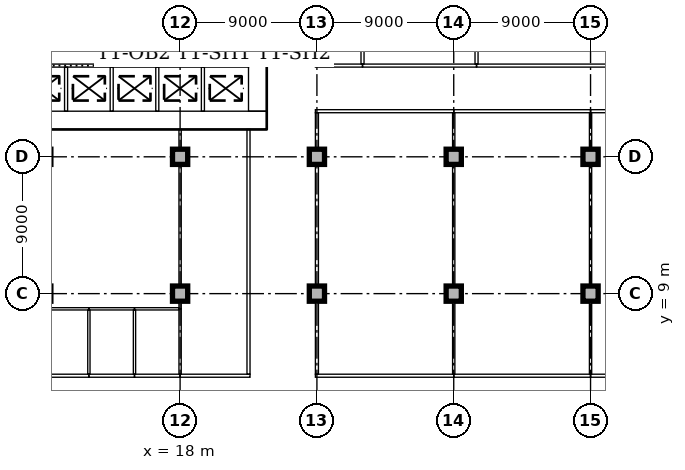
"""IFC4 building model, lengths in metres.
Left out: names, types, materials, properties, quantities, classifications, styles, units other than length and angle.
Written with IfcOpenShell. Run it as: python <this file> out.ifc"""

import sys

from ifc_helpers import new_model, si_unit, direction, frame, frame_2d, origin, origin_2d, place, context, subcontext, project, spatial, rectangle, extrude, element, fill, save


model = new_model("IFC4")
c1 = context("Model", 3, precision=1e-05, world=origin(), true_north=direction((0.0, 1.0)))
c2 = subcontext(c1, "Body", "Model", "MODEL_VIEW")
j1 = project(units=[si_unit("LENGTHUNIT", "METRE"), si_unit("PLANEANGLEUNIT", "RADIAN")], contexts=[c1])
p1 = place(None, origin())
s1 = spatial("IfcSite", under=j1, at=p1, CompositionType="ELEMENT")
p2 = place(p1, origin())
s2 = spatial("IfcBuilding", under=s1, at=p2, CompositionType="ELEMENT")
p3 = place(p2, origin())
s3 = spatial("IfcBuildingStorey", under=s2, at=p3, CompositionType="ELEMENT", Elevation=0.0)
p4 = place(p3, frame((3.9, 20.4, 0.0), z_axis=(0.0, 0.0, 1.0), x_axis=(1.0, 0.0, 0.0)))
e1 = element("IfcWall", 1, at=p4, inside=s3, PredefinedType="SOLIDWALL", context=c2, shape_type="SweptSolid", body=[
    extrude(rectangle(XDim=19.8, YDim=1.2, at=frame_2d((9.9, 0.0))), origin(), (0.0, 0.0, 1.0), 6.0),
])
p5 = place(p3, frame((23.1, 21.0, 0.0), z_axis=(0.0, 0.0, 1.0), x_axis=(0.0, 1.0, 0.0)))
e2 = element("IfcWall", 2, at=p5, inside=s3, PredefinedType="SOLIDWALL", context=c2, shape_type="SweptSolid", body=[
    extrude(rectangle(XDim=10.5, YDim=1.2, at=frame_2d((5.25, 0.0))), origin(), (0.0, 0.0, 1.0), 6.0),
])
p6 = place(p5, frame((4.35, 0.0, 0.0)))
e3 = element("IfcOpeningElement", 3, at=p6, cuts=e2, PredefinedType="OPENING", context=c2, shape_type="SweptSolid", body=[
    extrude(rectangle(XDim=1.8, YDim=2.1, at=frame_2d((0.9, 1.05))), frame((0.0, 0.61, 0.0), z_axis=(0.0, -1.0, 0.0), x_axis=(1.0, 0.0, 0.0)), (0.0, 0.0, 1.0), 1.22),
])
for number, where, z_axis, x_axis in (
    (4, (18.0, 9.0, 0.0), (0.0, 0.0, 1.0), (1.0, 0.0, 0.0)),
    (5, (18.0, 18.0, 0.0), (0.0, 0.0, 1.0), (1.0, 0.0, 0.0)),
    (6, (27.0, 9.0, 0.0), (0.0, 0.0, 1.0), (1.0, 0.0, 0.0)),
    (7, (27.0, 18.0, 0.0), (0.0, 0.0, 1.0), (1.0, 0.0, 0.0)),
    (8, (36.0, 9.0, 0.0), (0.0, 0.0, 1.0), (1.0, 0.0, 0.0)),
    (9, (36.0, 18.0, 0.0), (0.0, 0.0, 1.0), (1.0, 0.0, 0.0)),
    (10, (45.0, 9.0, 0.0), (0.0, 0.0, 1.0), (1.0, 0.0, 0.0)),
    (11, (45.0, 18.0, 0.0), (0.0, 0.0, 1.0), (1.0, 0.0, 0.0)),
):
    element("IfcColumn", number, at=place(p3, frame(where, z_axis=z_axis, x_axis=x_axis)), inside=s3, PredefinedType="COLUMN", context=c2, shape_type="SweptSolid", body=[
        extrude(rectangle(XDim=1.0, YDim=1.0, at=origin_2d()), origin(), (0.0, 0.0, 1.0), 5.7),
    ])
p7 = place(p3, frame((9.0, 3.6, 0.0), z_axis=(0.0, 0.0, 1.0), x_axis=(1.0, 0.0, 0.0)))
e12 = element("IfcWall", 12, at=p7, inside=s3, PredefinedType="PARTITIONING", context=c2, shape_type="SweptSolid", body=[
    extrude(rectangle(XDim=3.0, YDim=0.2, at=frame_2d((1.5, 0.0))), origin(), (0.0, 0.0, 1.0), 5.7),
])
p8 = place(p7, frame((1.0, 0.0, 0.0)))
e13 = element("IfcOpeningElement", 13, at=p8, cuts=e12, PredefinedType="OPENING", context=c2, shape_type="SweptSolid", body=[
    extrude(rectangle(XDim=1.0, YDim=2.1, at=frame_2d((0.5, 1.05))), frame((0.0, 0.11, 0.0), z_axis=(0.0, -1.0, 0.0), x_axis=(1.0, 0.0, 0.0)), (0.0, 0.0, 1.0), 0.22),
])
p9 = place(p3, frame((12.0, 3.6, 0.0), z_axis=(0.0, 0.0, 1.0), x_axis=(1.0, 0.0, 0.0)))
e14 = element("IfcWall", 14, at=p9, inside=s3, PredefinedType="PARTITIONING", context=c2, shape_type="SweptSolid", body=[
    extrude(rectangle(XDim=3.0, YDim=0.2, at=frame_2d((1.5, 0.0))), origin(), (0.0, 0.0, 1.0), 5.7),
])
p10 = place(p9, frame((1.0, 0.0, 0.0)))
e15 = element("IfcOpeningElement", 15, at=p10, cuts=e14, PredefinedType="OPENING", context=c2, shape_type="SweptSolid", body=[
    extrude(rectangle(XDim=1.0, YDim=2.1, at=frame_2d((0.5, 1.05))), frame((0.0, 0.11, 0.0), z_axis=(0.0, -1.0, 0.0), x_axis=(1.0, 0.0, 0.0)), (0.0, 0.0, 1.0), 0.22),
])
p11 = place(p3, frame((15.0, 3.6, 0.0), z_axis=(0.0, 0.0, 1.0), x_axis=(1.0, 0.0, 0.0)))
e16 = element("IfcWall", 16, at=p11, inside=s3, PredefinedType="PARTITIONING", context=c2, shape_type="SweptSolid", body=[
    extrude(rectangle(XDim=3.0, YDim=0.2, at=frame_2d((1.5, 0.0))), origin(), (0.0, 0.0, 1.0), 5.7),
])
p12 = place(p11, frame((1.0, 0.0, 0.0)))
e17 = element("IfcOpeningElement", 17, at=p12, cuts=e16, PredefinedType="OPENING", context=c2, shape_type="SweptSolid", body=[
    extrude(rectangle(XDim=1.0, YDim=2.1, at=frame_2d((0.5, 1.05))), frame((0.0, 0.11, 0.0), z_axis=(0.0, -1.0, 0.0), x_axis=(1.0, 0.0, 0.0)), (0.0, 0.0, 1.0), 0.22),
])
p13 = place(p3, frame((18.0, 3.6, 0.0), z_axis=(0.0, 0.0, 1.0), x_axis=(1.0, 0.0, 0.0)))
e18 = element("IfcWall", 18, at=p13, inside=s3, PredefinedType="PARTITIONING", context=c2, shape_type="SweptSolid", body=[
    extrude(rectangle(XDim=4.6, YDim=0.2, at=frame_2d((2.3, 0.0))), origin(), (0.0, 0.0, 1.0), 5.7),
])
p14 = place(p3, frame((26.9, 3.6, 0.0), z_axis=(0.0, 0.0, 1.0), x_axis=(1.0, 0.0, 0.0)))
e19 = element("IfcWall", 19, at=p14, inside=s3, PredefinedType="PARTITIONING", context=c2, shape_type="SweptSolid", body=[
    extrude(rectangle(XDim=9.1, YDim=0.2, at=frame_2d((4.55, 0.0))), origin(), (0.0, 0.0, 1.0), 5.7),
])
p15 = place(p3, frame((36.0, 3.6, 0.0), z_axis=(0.0, 0.0, 1.0), x_axis=(1.0, 0.0, 0.0)))
e20 = element("IfcWall", 20, at=p15, inside=s3, PredefinedType="PARTITIONING", context=c2, shape_type="SweptSolid", body=[
    extrude(rectangle(XDim=9.0, YDim=0.2, at=frame_2d((4.5, 0.0))), origin(), (0.0, 0.0, 1.0), 5.7),
])
p16 = place(p15, frame((4.0, 0.0, 0.0)))
e21 = element("IfcOpeningElement", 21, at=p16, cuts=e20, PredefinedType="OPENING", context=c2, shape_type="SweptSolid", body=[
    extrude(rectangle(XDim=1.0, YDim=2.1, at=frame_2d((0.5, 1.05))), frame((0.0, 0.11, 0.0), z_axis=(0.0, -1.0, 0.0), x_axis=(1.0, 0.0, 0.0)), (0.0, 0.0, 1.0), 0.22),
])
p17 = place(p3, frame((45.0, 3.6, 0.0), z_axis=(0.0, 0.0, 1.0), x_axis=(1.0, 0.0, 0.0)))
e22 = element("IfcWall", 22, at=p17, inside=s3, PredefinedType="PARTITIONING", context=c2, shape_type="SweptSolid", body=[
    extrude(rectangle(XDim=9.0, YDim=0.2, at=frame_2d((4.5, 0.0))), origin(), (0.0, 0.0, 1.0), 5.7),
])
p18 = place(p17, frame((4.0, 0.0, 0.0)))
e23 = element("IfcOpeningElement", 23, at=p18, cuts=e22, PredefinedType="OPENING", context=c2, shape_type="SweptSolid", body=[
    extrude(rectangle(XDim=1.0, YDim=2.1, at=frame_2d((0.5, 1.05))), frame((0.0, 0.11, 0.0), z_axis=(0.0, -1.0, 0.0), x_axis=(1.0, 0.0, 0.0)), (0.0, 0.0, 1.0), 0.22),
])
p19 = place(p3, frame((22.5, 3.7, 0.0), z_axis=(0.0, 0.0, 1.0), x_axis=(0.0, 1.0, 0.0)))
e24 = element("IfcWall", 24, at=p19, inside=s3, PredefinedType="PARTITIONING", context=c2, shape_type="SweptSolid", body=[
    extrude(rectangle(XDim=16.1, YDim=0.2, at=frame_2d((8.05, 0.0))), origin(), (0.0, 0.0, 1.0), 5.7),
])
p20 = place(p19, frame((7.5, 0.0, 0.0)))
e25 = element("IfcOpeningElement", 25, at=p20, cuts=e24, PredefinedType="OPENING", context=c2, shape_type="SweptSolid", body=[
    extrude(rectangle(XDim=1.0, YDim=2.1, at=frame_2d((0.5, 1.05))), frame((0.0, 0.11, 0.0), z_axis=(0.0, -1.0, 0.0), x_axis=(1.0, 0.0, 0.0)), (0.0, 0.0, 1.0), 0.22),
])
p21 = place(p3, frame((27.0, 3.7, 0.0), z_axis=(0.0, 0.0, 1.0), x_axis=(0.0, 1.0, 0.0)))
e26 = element("IfcWall", 26, at=p21, inside=s3, PredefinedType="PARTITIONING", context=c2, shape_type="SweptSolid", body=[
    extrude(rectangle(XDim=4.78, YDim=0.2, at=frame_2d((2.39, 0.0))), origin(), (0.0, 0.0, 1.0), 5.7),
])
p22 = place(p3, frame((27.0, 9.52, 0.0), z_axis=(0.0, 0.0, 1.0), x_axis=(0.0, 1.0, 0.0)))
e27 = element("IfcWall", 27, at=p22, inside=s3, PredefinedType="PARTITIONING", context=c2, shape_type="SweptSolid", body=[
    extrude(rectangle(XDim=7.96, YDim=0.2, at=frame_2d((3.98, 0.0))), origin(), (0.0, 0.0, 1.0), 5.7),
])
p23 = place(p22, frame((2.28, 0.0, 0.0)))
e28 = element("IfcOpeningElement", 28, at=p23, cuts=e27, PredefinedType="OPENING", context=c2, shape_type="SweptSolid", body=[
    extrude(rectangle(XDim=1.0, YDim=2.1, at=frame_2d((0.5, 1.05))), frame((0.0, 0.11, 0.0), z_axis=(0.0, -1.0, 0.0), x_axis=(1.0, 0.0, 0.0)), (0.0, 0.0, 1.0), 0.22),
])
for number, where, z_axis, x_axis in (
    (29, (27.0, 18.52, 0.0), (0.0, 0.0, 1.0), (0.0, 1.0, 0.0)),
    (30, (27.0, 24.1, 0.0), (0.0, 0.0, 1.0), (0.0, 1.0, 0.0)),
):
    element("IfcWall", number, at=place(p3, frame(where, z_axis=z_axis, x_axis=x_axis)), inside=s3, PredefinedType="PARTITIONING", context=c2, shape_type="SweptSolid", body=[
        extrude(rectangle(XDim=2.38, YDim=0.2, at=frame_2d((1.19, 0.0))), origin(), (0.0, 0.0, 1.0), 5.7),
    ])
p24 = place(p3, frame((26.9, 21.0, 0.0), z_axis=(0.0, 0.0, 1.0), x_axis=(1.0, 0.0, 0.0)))
e31 = element("IfcWall", 31, at=p24, inside=s3, PredefinedType="PARTITIONING", context=c2, shape_type="SweptSolid", body=[
    extrude(rectangle(XDim=9.1, YDim=0.2, at=frame_2d((4.55, 0.0))), origin(), (0.0, 0.0, 1.0), 5.7),
])
for number, where, z_axis, x_axis in (
    (32, (36.0, 21.0, 0.0), (0.0, 0.0, 1.0), (1.0, 0.0, 0.0)),
    (33, (45.0, 21.0, 0.0), (0.0, 0.0, 1.0), (1.0, 0.0, 0.0)),
):
    element("IfcWall", number, at=place(p3, frame(where, z_axis=z_axis, x_axis=x_axis)), inside=s3, PredefinedType="PARTITIONING", context=c2, shape_type="SweptSolid", body=[
        extrude(rectangle(XDim=9.0, YDim=0.2, at=frame_2d((4.5, 0.0))), origin(), (0.0, 0.0, 1.0), 5.7),
    ])
p25 = place(p3, frame((26.9, 24.0, 0.0), z_axis=(0.0, 0.0, 1.0), x_axis=(1.0, 0.0, 0.0)))
e34 = element("IfcWall", 34, at=p25, inside=s3, PredefinedType="PARTITIONING", context=c2, shape_type="SweptSolid", body=[
    extrude(rectangle(XDim=3.1, YDim=0.2, at=frame_2d((1.55, 0.0))), origin(), (0.0, 0.0, 1.0), 5.7),
])
p26 = place(p3, frame((30.0, 24.0, 0.0), z_axis=(0.0, 0.0, 1.0), x_axis=(1.0, 0.0, 0.0)))
e35 = element("IfcWall", 35, at=p26, inside=s3, PredefinedType="PARTITIONING", context=c2, shape_type="SweptSolid", body=[
    extrude(rectangle(XDim=7.5, YDim=0.2, at=frame_2d((3.75, 0.0))), origin(), (0.0, 0.0, 1.0), 5.7),
])
p27 = place(p26, frame((3.25, 0.0, 0.0)))
e36 = element("IfcOpeningElement", 36, at=p27, cuts=e35, PredefinedType="OPENING", context=c2, shape_type="SweptSolid", body=[
    extrude(rectangle(XDim=1.0, YDim=2.1, at=frame_2d((0.5, 1.05))), frame((0.0, 0.11, 0.0), z_axis=(0.0, -1.0, 0.0), x_axis=(1.0, 0.0, 0.0)), (0.0, 0.0, 1.0), 0.22),
])
p28 = place(p3, frame((37.5, 24.0, 0.0), z_axis=(0.0, 0.0, 1.0), x_axis=(1.0, 0.0, 0.0)))
e37 = element("IfcWall", 37, at=p28, inside=s3, PredefinedType="PARTITIONING", context=c2, shape_type="SweptSolid", body=[
    extrude(rectangle(XDim=10.5, YDim=0.2, at=frame_2d((5.25, 0.0))), origin(), (0.0, 0.0, 1.0), 5.7),
])
p29 = place(p3, frame((8.925, 8.0, 0.0), z_axis=(0.0, 0.0, 1.0), x_axis=(1.0, 0.0, 0.0)))
e38 = element("IfcWall", 38, at=p29, inside=s3, PredefinedType="PARTITIONING", context=c2, shape_type="SweptSolid", body=[
    extrude(rectangle(XDim=3.075, YDim=0.15, at=frame_2d((1.538, 0.0))), origin(), (0.0, 0.0, 1.0), 5.7),
])
p30 = place(p3, frame((12.0, 8.0, 0.0), z_axis=(0.0, 0.0, 1.0), x_axis=(1.0, 0.0, 0.0)))
e39 = element("IfcWall", 39, at=p30, inside=s3, PredefinedType="PARTITIONING", context=c2, shape_type="SweptSolid", body=[
    extrude(rectangle(XDim=3.0, YDim=0.15, at=frame_2d((1.5, 0.0))), origin(), (0.0, 0.0, 1.0), 5.7),
])
p31 = place(p3, frame((15.0, 8.0, 0.0), z_axis=(0.0, 0.0, 1.0), x_axis=(1.0, 0.0, 0.0)))
e40 = element("IfcWall", 40, at=p31, inside=s3, PredefinedType="PARTITIONING", context=c2, shape_type="SweptSolid", body=[
    extrude(rectangle(XDim=2.925, YDim=0.15, at=frame_2d((1.462, 0.0))), origin(), (0.0, 0.0, 1.0), 5.7),
])
p32 = place(p3, frame((18.0, 8.0, 0.0), z_axis=(0.0, 0.0, 1.0), x_axis=(0.0, 1.0, 0.0)))
e41 = element("IfcWall", 41, at=p32, inside=s3, PredefinedType="PARTITIONING", context=c2, shape_type="SweptSolid", body=[
    extrude(rectangle(XDim=0.48, YDim=0.15, at=frame_2d((0.24, 0.0))), origin(), (0.0, 0.0, 1.0), 5.7),
])
p33 = place(p3, frame((18.0, 9.52, 0.0), z_axis=(0.0, 0.0, 1.0), x_axis=(0.0, 1.0, 0.0)))
e42 = element("IfcWall", 42, at=p33, inside=s3, PredefinedType="PARTITIONING", context=c2, shape_type="SweptSolid", body=[
    extrude(rectangle(XDim=7.96, YDim=0.15, at=frame_2d((3.98, 0.0))), origin(), (0.0, 0.0, 1.0), 5.7),
])
p34 = place(p3, frame((18.0, 18.52, 0.0), z_axis=(0.0, 0.0, 1.0), x_axis=(0.0, 1.0, 0.0)))
e43 = element("IfcWall", 43, at=p34, inside=s3, PredefinedType="PARTITIONING", context=c2, shape_type="SweptSolid", body=[
    extrude(rectangle(XDim=1.28, YDim=0.15, at=frame_2d((0.64, 0.0))), origin(), (0.0, 0.0, 1.0), 5.7),
])
for number, where, z_axis, x_axis in (
    (44, (12.0, 3.7, 0.0), (0.0, 0.0, 1.0), (0.0, 1.0, 0.0)),
    (45, (15.0, 3.7, 0.0), (0.0, 0.0, 1.0), (0.0, 1.0, 0.0)),
):
    element("IfcWall", number, at=place(p3, frame(where, z_axis=z_axis, x_axis=x_axis)), inside=s3, PredefinedType="PARTITIONING", context=c2, shape_type="SweptSolid", body=[
        extrude(rectangle(XDim=4.225, YDim=0.15, at=frame_2d((2.112, 0.0))), origin(), (0.0, 0.0, 1.0), 5.7),
    ])
p35 = place(p3, frame((18.0, 3.7, 0.0), z_axis=(0.0, 0.0, 1.0), x_axis=(0.0, 1.0, 0.0)))
e46 = element("IfcWall", 46, at=p35, inside=s3, PredefinedType="PARTITIONING", context=c2, shape_type="SweptSolid", body=[
    extrude(rectangle(XDim=4.3, YDim=0.15, at=frame_2d((2.15, 0.0))), origin(), (0.0, 0.0, 1.0), 5.7),
])
p36 = place(p3, frame((36.0, 3.7, 0.0), z_axis=(0.0, 0.0, 1.0), x_axis=(0.0, 1.0, 0.0)))
e47 = element("IfcWall", 47, at=p36, inside=s3, PredefinedType="PARTITIONING", context=c2, shape_type="SweptSolid", body=[
    extrude(rectangle(XDim=4.78, YDim=0.15, at=frame_2d((2.39, 0.0))), origin(), (0.0, 0.0, 1.0), 5.7),
])
p37 = place(p3, frame((36.0, 9.52, 0.0), z_axis=(0.0, 0.0, 1.0), x_axis=(0.0, 1.0, 0.0)))
e48 = element("IfcWall", 48, at=p37, inside=s3, PredefinedType="PARTITIONING", context=c2, shape_type="SweptSolid", body=[
    extrude(rectangle(XDim=7.96, YDim=0.15, at=frame_2d((3.98, 0.0))), origin(), (0.0, 0.0, 1.0), 5.7),
])
p38 = place(p3, frame((36.0, 18.52, 0.0), z_axis=(0.0, 0.0, 1.0), x_axis=(0.0, 1.0, 0.0)))
e49 = element("IfcWall", 49, at=p38, inside=s3, PredefinedType="PARTITIONING", context=c2, shape_type="SweptSolid", body=[
    extrude(rectangle(XDim=2.38, YDim=0.15, at=frame_2d((1.19, 0.0))), origin(), (0.0, 0.0, 1.0), 5.7),
])
p39 = place(p3, frame((45.0, 3.7, 0.0), z_axis=(0.0, 0.0, 1.0), x_axis=(0.0, 1.0, 0.0)))
e50 = element("IfcWall", 50, at=p39, inside=s3, PredefinedType="PARTITIONING", context=c2, shape_type="SweptSolid", body=[
    extrude(rectangle(XDim=4.78, YDim=0.15, at=frame_2d((2.39, 0.0))), origin(), (0.0, 0.0, 1.0), 5.7),
])
p40 = place(p3, frame((45.0, 9.52, 0.0), z_axis=(0.0, 0.0, 1.0), x_axis=(0.0, 1.0, 0.0)))
e51 = element("IfcWall", 51, at=p40, inside=s3, PredefinedType="PARTITIONING", context=c2, shape_type="SweptSolid", body=[
    extrude(rectangle(XDim=7.96, YDim=0.15, at=frame_2d((3.98, 0.0))), origin(), (0.0, 0.0, 1.0), 5.7),
])
p41 = place(p3, frame((45.0, 18.52, 0.0), z_axis=(0.0, 0.0, 1.0), x_axis=(0.0, 1.0, 0.0)))
e52 = element("IfcWall", 52, at=p41, inside=s3, PredefinedType="PARTITIONING", context=c2, shape_type="SweptSolid", body=[
    extrude(rectangle(XDim=2.38, YDim=0.15, at=frame_2d((1.19, 0.0))), origin(), (0.0, 0.0, 1.0), 5.7),
])
for number, where, z_axis, x_axis in (
    (53, (30.0, 24.1, 0.0), (0.0, 0.0, 1.0), (0.0, 1.0, 0.0)),
    (54, (37.5, 24.1, 0.0), (0.0, 0.0, 1.0), (0.0, 1.0, 0.0)),
):
    element("IfcWall", number, at=place(p3, frame(where, z_axis=z_axis, x_axis=x_axis)), inside=s3, PredefinedType="PARTITIONING", context=c2, shape_type="SweptSolid", body=[
        extrude(rectangle(XDim=5.15, YDim=0.2, at=frame_2d((2.575, 0.0))), origin(), (0.0, 0.0, 1.0), 5.7),
    ])
p42 = place(p3, frame((4.5, 24.0, 0.0), z_axis=(0.0, 0.0, 1.0), x_axis=(1.0, 0.0, 0.0)))
e55 = element("IfcWall", 55, at=p42, inside=s3, PredefinedType="PARTITIONING", context=c2, shape_type="SweptSolid", body=[
    extrude(rectangle(XDim=18.0, YDim=0.2, at=frame_2d((9.0, 0.0))), origin(), (0.0, 0.0, 1.0), 5.7),
])
p43 = place(p42, frame((0.95, 0.0, 0.0)))
e56 = element("IfcOpeningElement", 56, at=p43, cuts=e55, PredefinedType="OPENING", context=c2, shape_type="SweptSolid", body=[
    extrude(rectangle(XDim=1.1, YDim=2.1, at=frame_2d((0.55, 1.05))), frame((0.0, 0.11, 0.0), z_axis=(0.0, -1.0, 0.0), x_axis=(1.0, 0.0, 0.0)), (0.0, 0.0, 1.0), 0.22),
])
p44 = place(p42, frame((3.95, 0.0, 0.0)))
e57 = element("IfcOpeningElement", 57, at=p44, cuts=e55, PredefinedType="OPENING", context=c2, shape_type="SweptSolid", body=[
    extrude(rectangle(XDim=1.1, YDim=2.1, at=frame_2d((0.55, 1.05))), frame((0.0, 0.11, 0.0), z_axis=(0.0, -1.0, 0.0), x_axis=(1.0, 0.0, 0.0)), (0.0, 0.0, 1.0), 0.22),
])
p45 = place(p42, frame((6.95, 0.0, 0.0)))
e58 = element("IfcOpeningElement", 58, at=p45, cuts=e55, PredefinedType="OPENING", context=c2, shape_type="SweptSolid", body=[
    extrude(rectangle(XDim=1.1, YDim=2.1, at=frame_2d((0.55, 1.05))), frame((0.0, 0.11, 0.0), z_axis=(0.0, -1.0, 0.0), x_axis=(1.0, 0.0, 0.0)), (0.0, 0.0, 1.0), 0.22),
])
p46 = place(p42, frame((9.95, 0.0, 0.0)))
e59 = element("IfcOpeningElement", 59, at=p46, cuts=e55, PredefinedType="OPENING", context=c2, shape_type="SweptSolid", body=[
    extrude(rectangle(XDim=1.1, YDim=2.1, at=frame_2d((0.55, 1.05))), frame((0.0, 0.11, 0.0), z_axis=(0.0, -1.0, 0.0), x_axis=(1.0, 0.0, 0.0)), (0.0, 0.0, 1.0), 0.22),
])
p47 = place(p42, frame((12.95, 0.0, 0.0)))
e60 = element("IfcOpeningElement", 60, at=p47, cuts=e55, PredefinedType="OPENING", context=c2, shape_type="SweptSolid", body=[
    extrude(rectangle(XDim=1.1, YDim=2.1, at=frame_2d((0.55, 1.05))), frame((0.0, 0.11, 0.0), z_axis=(0.0, -1.0, 0.0), x_axis=(1.0, 0.0, 0.0)), (0.0, 0.0, 1.0), 0.22),
])
p48 = place(p42, frame((15.95, 0.0, 0.0)))
e61 = element("IfcOpeningElement", 61, at=p48, cuts=e55, PredefinedType="OPENING", context=c2, shape_type="SweptSolid", body=[
    extrude(rectangle(XDim=1.1, YDim=2.1, at=frame_2d((0.55, 1.05))), frame((0.0, 0.11, 0.0), z_axis=(0.0, -1.0, 0.0), x_axis=(1.0, 0.0, 0.0)), (0.0, 0.0, 1.0), 0.22),
])
for number, where, z_axis, x_axis in (
    (62, (10.5, 21.0, 0.0), (0.0, 0.0, 1.0), (0.0, 1.0, 0.0)),
    (63, (13.5, 21.0, 0.0), (0.0, 0.0, 1.0), (0.0, 1.0, 0.0)),
    (64, (16.5, 21.0, 0.0), (0.0, 0.0, 1.0), (0.0, 1.0, 0.0)),
    (65, (19.5, 21.0, 0.0), (0.0, 0.0, 1.0), (0.0, 1.0, 0.0)),
):
    element("IfcWall", number, at=place(p3, frame(where, z_axis=z_axis, x_axis=x_axis)), inside=s3, PredefinedType="PARTITIONING", context=c2, shape_type="SweptSolid", body=[
        extrude(rectangle(XDim=2.9, YDim=0.2, at=frame_2d((1.45, 0.0))), origin(), (0.0, 0.0, 1.0), 5.7),
    ])
p49 = place(p8, origin())
e66 = element("IfcDoor", 66, at=p49, inside=s3, OperationType="SINGLE_SWING_LEFT", PredefinedType="DOOR", context=c2, shape_type="SweptSolid", body=[
    extrude(rectangle(XDim=1.0, YDim=2.1, at=frame_2d((0.5, 1.05))), frame((0.0, 0.025, 0.0), z_axis=(0.0, -1.0, 0.0), x_axis=(1.0, 0.0, 0.0)), (0.0, 0.0, 1.0), 0.05),
])
fill(e13, e66)
p50 = place(p10, origin())
e67 = element("IfcDoor", 67, at=p50, inside=s3, OperationType="SINGLE_SWING_LEFT", PredefinedType="DOOR", context=c2, shape_type="SweptSolid", body=[
    extrude(rectangle(XDim=1.0, YDim=2.1, at=frame_2d((0.5, 1.05))), frame((0.0, 0.025, 0.0), z_axis=(0.0, -1.0, 0.0), x_axis=(1.0, 0.0, 0.0)), (0.0, 0.0, 1.0), 0.05),
])
fill(e15, e67)
p51 = place(p12, origin())
e68 = element("IfcDoor", 68, at=p51, inside=s3, OperationType="SINGLE_SWING_RIGHT", PredefinedType="DOOR", context=c2, shape_type="SweptSolid", body=[
    extrude(rectangle(XDim=1.0, YDim=2.1, at=frame_2d((0.5, 1.05))), frame((0.0, 0.025, 0.0), z_axis=(0.0, -1.0, 0.0), x_axis=(1.0, 0.0, 0.0)), (0.0, 0.0, 1.0), 0.05),
])
fill(e17, e68)
p52 = place(p20, origin())
e69 = element("IfcDoor", 69, at=p52, inside=s3, OperationType="SINGLE_SWING_LEFT", PredefinedType="DOOR", context=c2, shape_type="SweptSolid", body=[
    extrude(rectangle(XDim=1.0, YDim=2.1, at=frame_2d((0.5, 1.05))), frame((0.0, 0.025, 0.0), z_axis=(0.0, -1.0, 0.0), x_axis=(1.0, 0.0, 0.0)), (0.0, 0.0, 1.0), 0.05),
])
fill(e25, e69)
p53 = place(p23, frame((1.0, 0.0, 0.0), z_axis=(0.0, 0.0, 1.0), x_axis=(-1.0, 0.0, 0.0)))
e70 = element("IfcDoor", 70, at=p53, inside=s3, OperationType="SINGLE_SWING_LEFT", PredefinedType="DOOR", context=c2, shape_type="SweptSolid", body=[
    extrude(rectangle(XDim=1.0, YDim=2.1, at=frame_2d((0.5, 1.05))), frame((0.0, 0.025, 0.0), z_axis=(0.0, -1.0, 0.0), x_axis=(1.0, 0.0, 0.0)), (0.0, 0.0, 1.0), 0.05),
])
fill(e28, e70)
p54 = place(p16, origin())
e71 = element("IfcDoor", 71, at=p54, inside=s3, OperationType="SINGLE_SWING_RIGHT", PredefinedType="DOOR", context=c2, shape_type="SweptSolid", body=[
    extrude(rectangle(XDim=1.0, YDim=2.1, at=frame_2d((0.5, 1.05))), frame((0.0, 0.025, 0.0), z_axis=(0.0, -1.0, 0.0), x_axis=(1.0, 0.0, 0.0)), (0.0, 0.0, 1.0), 0.05),
])
fill(e21, e71)
p55 = place(p27, origin())
e72 = element("IfcDoor", 72, at=p55, inside=s3, OperationType="SINGLE_SWING_RIGHT", PredefinedType="DOOR", context=c2, shape_type="SweptSolid", body=[
    extrude(rectangle(XDim=1.0, YDim=2.1, at=frame_2d((0.5, 1.05))), frame((0.0, 0.025, 0.0), z_axis=(0.0, -1.0, 0.0), x_axis=(1.0, 0.0, 0.0)), (0.0, 0.0, 1.0), 0.05),
])
fill(e36, e72)
p56 = place(p45, origin())
e73 = element("IfcDoor", 73, at=p56, inside=s3, OperationType="SLIDING_TO_LEFT", PredefinedType="DOOR", context=c2, shape_type="SweptSolid", body=[
    extrude(rectangle(XDim=1.1, YDim=2.1, at=frame_2d((0.55, 1.05))), frame((0.0, 0.025, 0.0), z_axis=(0.0, -1.0, 0.0), x_axis=(1.0, 0.0, 0.0)), (0.0, 0.0, 1.0), 0.05),
])
fill(e58, e73)
p57 = place(p46, origin())
e74 = element("IfcDoor", 74, at=p57, inside=s3, OperationType="SLIDING_TO_LEFT", PredefinedType="DOOR", context=c2, shape_type="SweptSolid", body=[
    extrude(rectangle(XDim=1.1, YDim=2.1, at=frame_2d((0.55, 1.05))), frame((0.0, 0.025, 0.0), z_axis=(0.0, -1.0, 0.0), x_axis=(1.0, 0.0, 0.0)), (0.0, 0.0, 1.0), 0.05),
])
fill(e59, e74)
p58 = place(p47, origin())
e75 = element("IfcDoor", 75, at=p58, inside=s3, OperationType="SLIDING_TO_LEFT", PredefinedType="DOOR", context=c2, shape_type="SweptSolid", body=[
    extrude(rectangle(XDim=1.1, YDim=2.1, at=frame_2d((0.55, 1.05))), frame((0.0, 0.025, 0.0), z_axis=(0.0, -1.0, 0.0), x_axis=(1.0, 0.0, 0.0)), (0.0, 0.0, 1.0), 0.05),
])
fill(e60, e75)
p59 = place(p48, origin())
e76 = element("IfcDoor", 76, at=p59, inside=s3, OperationType="SLIDING_TO_LEFT", PredefinedType="DOOR", context=c2, shape_type="SweptSolid", body=[
    extrude(rectangle(XDim=1.1, YDim=2.1, at=frame_2d((0.55, 1.05))), frame((0.0, 0.025, 0.0), z_axis=(0.0, -1.0, 0.0), x_axis=(1.0, 0.0, 0.0)), (0.0, 0.0, 1.0), 0.05),
])
fill(e61, e76)
save(model, sys.argv[1])
